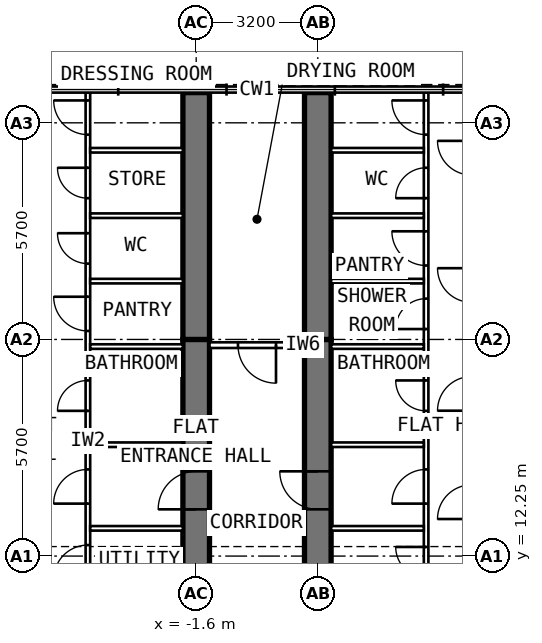
"""IFC4 building model, lengths in metres.
Left out: names, types, materials, properties, quantities, classifications, styles, units other than length and angle.
Written with IfcOpenShell. Run it as: python <this file> out.ifc"""

import sys

from ifc_helpers import new_model, si_unit, direction, frame, frame_2d, origin, place, context, subcontext, project, spatial, rectangle, extrude, element, fill, save


model = new_model("IFC4")
c1 = context("Model", 3, precision=1e-05, world=origin(), true_north=direction((0.0, 1.0)))
c2 = subcontext(c1, "Body", "Model", "MODEL_VIEW")
j1 = project(units=[si_unit("LENGTHUNIT", "METRE"), si_unit("PLANEANGLEUNIT", "RADIAN")], contexts=[c1])
p1 = place(None, origin())
s1 = spatial("IfcSite", under=j1, at=p1, CompositionType="ELEMENT")
p2 = place(p1, origin())
s2 = spatial("IfcBuilding", under=s1, at=p2, CompositionType="ELEMENT")
p3 = place(p2, frame((0.0, 0.0, 281.8)))
s3 = spatial("IfcBuildingStorey", under=s2, at=p3, CompositionType="ELEMENT", Elevation=281.8)
p4 = place(p3, frame((-1.6, 9.6, 0.0), z_axis=(0.0, 0.0, 1.0), x_axis=(0.0, 1.0, 0.0)))
e1 = element("IfcWall", 1, at=p4, inside=s3, PredefinedType="SHEAR", context=c2, shape_type="SweptSolid", body=[
    extrude(rectangle(XDim=8.35, YDim=0.7, at=frame_2d((4.175, 0.0))), origin(), (0.0, 0.0, 1.0), 3.6),
])
p5 = place(p4, frame((3.88, 0.0, 0.0)))
e2 = element("IfcOpeningElement", 2, at=p5, cuts=e1, PredefinedType="OPENING", context=c2, shape_type="SweptSolid", body=[
    extrude(rectangle(XDim=1.0, YDim=2.1, at=frame_2d((0.5, 1.05))), frame((0.0, 0.362, 0.0), z_axis=(0.0, -1.0, 0.0), x_axis=(1.0, 0.0, 0.0)), (0.0, 0.0, 1.0), 0.724),
])
p6 = place(p3, frame((-1.6, 17.95, 0.0), z_axis=(0.0, 0.0, 1.0), x_axis=(0.0, 1.0, 0.0)))
e3 = element("IfcWall", 3, at=p6, inside=s3, PredefinedType="SHEAR", context=c2, shape_type="SweptSolid", body=[
    extrude(rectangle(XDim=6.495, YDim=0.7, at=frame_2d((3.248, 0.0))), origin(), (0.0, 0.0, 1.0), 3.6),
])
p7 = place(p3, frame((1.6, 9.6, 0.0), z_axis=(0.0, 0.0, 1.0), x_axis=(0.0, 1.0, 0.0)))
e4 = element("IfcWall", 4, at=p7, inside=s3, PredefinedType="SHEAR", context=c2, shape_type="SweptSolid", body=[
    extrude(rectangle(XDim=8.35, YDim=0.7, at=frame_2d((4.175, 0.0))), origin(), (0.0, 0.0, 1.0), 3.6),
])
p8 = place(p7, frame((3.88, 0.0, 0.0)))
e5 = element("IfcOpeningElement", 5, at=p8, cuts=e4, PredefinedType="OPENING", context=c2, shape_type="SweptSolid", body=[
    extrude(rectangle(XDim=1.0, YDim=2.1, at=frame_2d((0.5, 1.05))), frame((0.0, 0.362, 0.0), z_axis=(0.0, -1.0, 0.0), x_axis=(1.0, 0.0, 0.0)), (0.0, 0.0, 1.0), 0.724),
])
p9 = place(p3, frame((1.6, 17.95, 0.0), z_axis=(0.0, 0.0, 1.0), x_axis=(0.0, 1.0, 0.0)))
e6 = element("IfcWall", 6, at=p9, inside=s3, PredefinedType="SHEAR", context=c2, shape_type="SweptSolid", body=[
    extrude(rectangle(XDim=6.495, YDim=0.7, at=frame_2d((3.248, 0.0))), origin(), (0.0, 0.0, 1.0), 3.6),
])
p10 = place(p3, frame((-4.45, 9.875, 0.0), z_axis=(0.0, 0.0, 1.0), x_axis=(0.0, 1.0, 0.0)))
e7 = element("IfcWall", 7, at=p10, inside=s3, PredefinedType="PARTITIONING", context=c2, shape_type="SweptSolid", body=[
    extrude(rectangle(XDim=14.57, YDim=0.12, at=frame_2d((7.285, 0.0))), origin(), (0.0, 0.0, 1.0), 3.35),
])
p11 = place(p10, frame((1.765, 0.0, 0.0)))
e8 = element("IfcOpeningElement", 8, at=p11, cuts=e7, PredefinedType="OPENING", context=c2, shape_type="SweptSolid", body=[
    extrude(rectangle(XDim=0.9, YDim=2.1, at=frame_2d((0.45, 1.05))), frame((0.0, 0.072, 0.0), z_axis=(0.0, -1.0, 0.0), x_axis=(1.0, 0.0, 0.0)), (0.0, 0.0, 1.0), 0.144),
])
p12 = place(p10, frame((3.755, 0.0, 0.0)))
e9 = element("IfcOpeningElement", 9, at=p12, cuts=e7, PredefinedType="OPENING", context=c2, shape_type="SweptSolid", body=[
    extrude(rectangle(XDim=0.9, YDim=2.1, at=frame_2d((0.45, 1.05))), frame((0.0, 0.072, 0.0), z_axis=(0.0, -1.0, 0.0), x_axis=(1.0, 0.0, 0.0)), (0.0, 0.0, 1.0), 0.144),
])
p13 = place(p10, frame((6.196, 0.0, 0.0)))
e10 = element("IfcOpeningElement", 10, at=p13, cuts=e7, PredefinedType="OPENING", context=c2, shape_type="SweptSolid", body=[
    extrude(rectangle(XDim=0.8, YDim=2.1, at=frame_2d((0.4, 1.05))), frame((0.0, 0.072, 0.0), z_axis=(0.0, -1.0, 0.0), x_axis=(1.0, 0.0, 0.0)), (0.0, 0.0, 1.0), 0.144),
])
p14 = place(p10, frame((8.299, 0.0, 0.0)))
e11 = element("IfcOpeningElement", 11, at=p14, cuts=e7, PredefinedType="OPENING", context=c2, shape_type="SweptSolid", body=[
    extrude(rectangle(XDim=0.9, YDim=2.1, at=frame_2d((0.45, 1.05))), frame((0.0, 0.072, 0.0), z_axis=(0.0, -1.0, 0.0), x_axis=(1.0, 0.0, 0.0)), (0.0, 0.0, 1.0), 0.144),
])
p15 = place(p10, frame((10.071, 0.0, 0.0)))
e12 = element("IfcOpeningElement", 12, at=p15, cuts=e7, PredefinedType="OPENING", context=c2, shape_type="SweptSolid", body=[
    extrude(rectangle(XDim=0.8, YDim=2.1, at=frame_2d((0.4, 1.05))), frame((0.0, 0.072, 0.0), z_axis=(0.0, -1.0, 0.0), x_axis=(1.0, 0.0, 0.0)), (0.0, 0.0, 1.0), 0.144),
])
p16 = place(p10, frame((11.792, 0.0, 0.0)))
e13 = element("IfcOpeningElement", 13, at=p16, cuts=e7, PredefinedType="OPENING", context=c2, shape_type="SweptSolid", body=[
    extrude(rectangle(XDim=0.8, YDim=2.1, at=frame_2d((0.4, 1.05))), frame((0.0, 0.072, 0.0), z_axis=(0.0, -1.0, 0.0), x_axis=(1.0, 0.0, 0.0)), (0.0, 0.0, 1.0), 0.144),
])
p17 = place(p10, frame((13.464, 0.0, 0.0)))
e14 = element("IfcOpeningElement", 14, at=p17, cuts=e7, PredefinedType="OPENING", context=c2, shape_type="SweptSolid", body=[
    extrude(rectangle(XDim=0.9, YDim=2.1, at=frame_2d((0.45, 1.05))), frame((0.0, 0.072, 0.0), z_axis=(0.0, -1.0, 0.0), x_axis=(1.0, 0.0, 0.0)), (0.0, 0.0, 1.0), 0.144),
])
for number, where, z_axis, x_axis in (
    (15, (-1.95, 12.98, 0.0), (0.0, 0.0, 1.0), (-1.0, 0.0, 0.0)),
    (16, (-1.95, 15.18, 0.0), (0.0, 0.0, 1.0), (-1.0, 0.0, 0.0)),
):
    element("IfcWall", number, at=place(p3, frame(where, z_axis=z_axis, x_axis=x_axis)), inside=s3, PredefinedType="PARTITIONING", context=c2, shape_type="SweptSolid", body=[
        extrude(rectangle(XDim=2.44, YDim=0.12, at=frame_2d((1.22, 0.0))), origin(), (0.0, 0.0, 1.0), 3.35),
    ])
p18 = place(p3, frame((-1.95, 17.763, 0.0), z_axis=(0.0, 0.0, 1.0), x_axis=(-1.0, 0.0, 0.0)))
e17 = element("IfcWall", 17, at=p18, inside=s3, PredefinedType="PARTITIONING", context=c2, shape_type="SweptSolid", body=[
    extrude(rectangle(XDim=2.44, YDim=0.12, at=frame_2d((1.22, 0.0))), origin(), (0.0, 0.0, 1.0), 2.45),
])
for number, where, z_axis, x_axis in (
    (18, (-1.95, 19.485, 0.0), (0.0, 0.0, 1.0), (-1.0, 0.0, 0.0)),
    (19, (-1.95, 21.206, 0.0), (0.0, 0.0, 1.0), (-1.0, 0.0, 0.0)),
    (20, (-1.95, 22.928, 0.0), (0.0, 0.0, 1.0), (-1.0, 0.0, 0.0)),
):
    element("IfcWall", number, at=place(p3, frame(where, z_axis=z_axis, x_axis=x_axis)), inside=s3, PredefinedType="PARTITIONING", context=c2, shape_type="SweptSolid", body=[
        extrude(rectangle(XDim=2.44, YDim=0.12, at=frame_2d((1.22, 0.0))), origin(), (0.0, 0.0, 1.0), 3.35),
    ])
p19 = place(p3, frame((4.45, 9.875, 0.0), z_axis=(0.0, 0.0, 1.0), x_axis=(0.0, 1.0, 0.0)))
e21 = element("IfcWall", 21, at=p19, inside=s3, PredefinedType="PARTITIONING", context=c2, shape_type="SweptSolid", body=[
    extrude(rectangle(XDim=14.57, YDim=0.12, at=frame_2d((7.285, 0.0))), origin(), (0.0, 0.0, 1.0), 3.35),
])
p20 = place(p19, frame((1.815, 0.0, 0.0)))
e22 = element("IfcOpeningElement", 22, at=p20, cuts=e21, PredefinedType="OPENING", context=c2, shape_type="SweptSolid", body=[
    extrude(rectangle(XDim=0.8, YDim=2.1, at=frame_2d((0.4, 1.05))), frame((0.0, 0.072, 0.0), z_axis=(0.0, -1.0, 0.0), x_axis=(1.0, 0.0, 0.0)), (0.0, 0.0, 1.0), 0.144),
])
p21 = place(p19, frame((3.755, 0.0, 0.0)))
e23 = element("IfcOpeningElement", 23, at=p21, cuts=e21, PredefinedType="OPENING", context=c2, shape_type="SweptSolid", body=[
    extrude(rectangle(XDim=0.9, YDim=2.1, at=frame_2d((0.45, 1.05))), frame((0.0, 0.072, 0.0), z_axis=(0.0, -1.0, 0.0), x_axis=(1.0, 0.0, 0.0)), (0.0, 0.0, 1.0), 0.144),
])
p22 = place(p19, frame((6.196, 0.0, 0.0)))
e24 = element("IfcOpeningElement", 24, at=p22, cuts=e21, PredefinedType="OPENING", context=c2, shape_type="SweptSolid", body=[
    extrude(rectangle(XDim=0.8, YDim=2.1, at=frame_2d((0.4, 1.05))), frame((0.0, 0.072, 0.0), z_axis=(0.0, -1.0, 0.0), x_axis=(1.0, 0.0, 0.0)), (0.0, 0.0, 1.0), 0.144),
])
p23 = place(p19, frame((8.349, 0.0, 0.0)))
e25 = element("IfcOpeningElement", 25, at=p23, cuts=e21, PredefinedType="OPENING", context=c2, shape_type="SweptSolid", body=[
    extrude(rectangle(XDim=0.8, YDim=2.1, at=frame_2d((0.4, 1.05))), frame((0.0, 0.072, 0.0), z_axis=(0.0, -1.0, 0.0), x_axis=(1.0, 0.0, 0.0)), (0.0, 0.0, 1.0), 0.144),
])
p24 = place(p19, frame((10.021, 0.0, 0.0)))
e26 = element("IfcOpeningElement", 26, at=p24, cuts=e21, PredefinedType="OPENING", context=c2, shape_type="SweptSolid", body=[
    extrude(rectangle(XDim=0.9, YDim=2.1, at=frame_2d((0.45, 1.05))), frame((0.0, 0.072, 0.0), z_axis=(0.0, -1.0, 0.0), x_axis=(1.0, 0.0, 0.0)), (0.0, 0.0, 1.0), 0.144),
])
p25 = place(p19, frame((11.792, 0.0, 0.0)))
e27 = element("IfcOpeningElement", 27, at=p25, cuts=e21, PredefinedType="OPENING", context=c2, shape_type="SweptSolid", body=[
    extrude(rectangle(XDim=0.8, YDim=2.1, at=frame_2d((0.4, 1.05))), frame((0.0, 0.072, 0.0), z_axis=(0.0, -1.0, 0.0), x_axis=(1.0, 0.0, 0.0)), (0.0, 0.0, 1.0), 0.144),
])
p26 = place(p19, frame((13.464, 0.0, 0.0)))
e28 = element("IfcOpeningElement", 28, at=p26, cuts=e21, PredefinedType="OPENING", context=c2, shape_type="SweptSolid", body=[
    extrude(rectangle(XDim=0.9, YDim=2.1, at=frame_2d((0.45, 1.05))), frame((0.0, 0.072, 0.0), z_axis=(0.0, -1.0, 0.0), x_axis=(1.0, 0.0, 0.0)), (0.0, 0.0, 1.0), 0.144),
])
for number, where, z_axis, x_axis in (
    (29, (1.95, 12.98, 0.0), (0.0, 0.0, 1.0), (1.0, 0.0, 0.0)),
    (30, (1.95, 15.18, 0.0), (0.0, 0.0, 1.0), (1.0, 0.0, 0.0)),
):
    element("IfcWall", number, at=place(p3, frame(where, z_axis=z_axis, x_axis=x_axis)), inside=s3, PredefinedType="PARTITIONING", context=c2, shape_type="SweptSolid", body=[
        extrude(rectangle(XDim=2.44, YDim=0.12, at=frame_2d((1.22, 0.0))), origin(), (0.0, 0.0, 1.0), 3.35),
    ])
p27 = place(p3, frame((1.95, 17.763, 0.0), z_axis=(0.0, 0.0, 1.0), x_axis=(1.0, 0.0, 0.0)))
e31 = element("IfcWall", 31, at=p27, inside=s3, PredefinedType="PARTITIONING", context=c2, shape_type="SweptSolid", body=[
    extrude(rectangle(XDim=2.44, YDim=0.12, at=frame_2d((1.22, 0.0))), origin(), (0.0, 0.0, 1.0), 2.45),
])
for number, where, z_axis, x_axis in (
    (32, (1.95, 19.485, 0.0), (0.0, 0.0, 1.0), (1.0, 0.0, 0.0)),
    (33, (1.95, 21.206, 0.0), (0.0, 0.0, 1.0), (1.0, 0.0, 0.0)),
    (34, (1.95, 22.928, 0.0), (0.0, 0.0, 1.0), (1.0, 0.0, 0.0)),
):
    element("IfcWall", number, at=place(p3, frame(where, z_axis=z_axis, x_axis=x_axis)), inside=s3, PredefinedType="PARTITIONING", context=c2, shape_type="SweptSolid", body=[
        extrude(rectangle(XDim=2.44, YDim=0.12, at=frame_2d((1.22, 0.0))), origin(), (0.0, 0.0, 1.0), 3.35),
    ])
p28 = place(p3, frame((1.25, 17.8, 0.0), z_axis=(0.0, 0.0, 1.0), x_axis=(-1.0, 0.0, 0.0)))
e35 = element("IfcWall", 35, at=p28, inside=s3, PredefinedType="PARTITIONING", context=c2, shape_type="SweptSolid", body=[
    extrude(rectangle(XDim=2.5, YDim=0.15, at=frame_2d((1.25, 0.0))), origin(), (0.0, 0.0, 1.0), 3.35),
])
p29 = place(p28, frame((0.75, 0.0, 0.0)))
e36 = element("IfcOpeningElement", 36, at=p29, cuts=e35, PredefinedType="OPENING", context=c2, shape_type="SweptSolid", body=[
    extrude(rectangle(XDim=1.0, YDim=2.1, at=frame_2d((0.5, 1.05))), frame((0.0, 0.087, 0.0), z_axis=(0.0, -1.0, 0.0), x_axis=(1.0, 0.0, 0.0)), (0.0, 0.0, 1.0), 0.174),
])
p30 = place(p5, origin())
e37 = element("IfcDoor", 37, at=p30, inside=s3, OperationType="SINGLE_SWING_LEFT", PredefinedType="DOOR", context=c2, shape_type="SweptSolid", body=[
    extrude(rectangle(XDim=1.0, YDim=2.1, at=frame_2d((0.5, 1.05))), frame((0.0, 0.1, 0.0), z_axis=(0.0, -1.0, 0.0), x_axis=(1.0, 0.0, 0.0)), (0.0, 0.0, 1.0), 0.2),
])
fill(e2, e37)
p31 = place(p11, origin())
e38 = element("IfcDoor", 38, at=p31, inside=s3, OperationType="SINGLE_SWING_LEFT", PredefinedType="DOOR", context=c2, shape_type="SweptSolid", body=[
    extrude(rectangle(XDim=0.9, YDim=2.1, at=frame_2d((0.45, 1.05))), frame((0.0, 0.025, 0.0), z_axis=(0.0, -1.0, 0.0), x_axis=(1.0, 0.0, 0.0)), (0.0, 0.0, 1.0), 0.05),
])
fill(e8, e38)
p32 = place(p12, origin())
e39 = element("IfcDoor", 39, at=p32, inside=s3, OperationType="SINGLE_SWING_LEFT", PredefinedType="DOOR", context=c2, shape_type="SweptSolid", body=[
    extrude(rectangle(XDim=0.9, YDim=2.1, at=frame_2d((0.45, 1.05))), frame((0.0, 0.025, 0.0), z_axis=(0.0, -1.0, 0.0), x_axis=(1.0, 0.0, 0.0)), (0.0, 0.0, 1.0), 0.05),
])
fill(e9, e39)
p33 = place(p13, origin())
e40 = element("IfcDoor", 40, at=p33, inside=s3, OperationType="SINGLE_SWING_LEFT", PredefinedType="DOOR", context=c2, shape_type="SweptSolid", body=[
    extrude(rectangle(XDim=0.8, YDim=2.1, at=frame_2d((0.4, 1.05))), frame((0.0, 0.025, 0.0), z_axis=(0.0, -1.0, 0.0), x_axis=(1.0, 0.0, 0.0)), (0.0, 0.0, 1.0), 0.05),
])
fill(e10, e40)
p34 = place(p14, origin())
e41 = element("IfcDoor", 41, at=p34, inside=s3, OperationType="SINGLE_SWING_RIGHT", PredefinedType="DOOR", context=c2, shape_type="SweptSolid", body=[
    extrude(rectangle(XDim=0.9, YDim=2.1, at=frame_2d((0.45, 1.05))), frame((0.0, 0.025, 0.0), z_axis=(0.0, -1.0, 0.0), x_axis=(1.0, 0.0, 0.0)), (0.0, 0.0, 1.0), 0.05),
])
fill(e11, e41)
p35 = place(p15, origin())
e42 = element("IfcDoor", 42, at=p35, inside=s3, OperationType="SINGLE_SWING_RIGHT", PredefinedType="DOOR", context=c2, shape_type="SweptSolid", body=[
    extrude(rectangle(XDim=0.8, YDim=2.1, at=frame_2d((0.4, 1.05))), frame((0.0, 0.025, 0.0), z_axis=(0.0, -1.0, 0.0), x_axis=(1.0, 0.0, 0.0)), (0.0, 0.0, 1.0), 0.05),
])
fill(e12, e42)
p36 = place(p16, origin())
e43 = element("IfcDoor", 43, at=p36, inside=s3, OperationType="SINGLE_SWING_RIGHT", PredefinedType="DOOR", context=c2, shape_type="SweptSolid", body=[
    extrude(rectangle(XDim=0.8, YDim=2.1, at=frame_2d((0.4, 1.05))), frame((0.0, 0.025, 0.0), z_axis=(0.0, -1.0, 0.0), x_axis=(1.0, 0.0, 0.0)), (0.0, 0.0, 1.0), 0.05),
])
fill(e13, e43)
p37 = place(p17, origin())
e44 = element("IfcDoor", 44, at=p37, inside=s3, OperationType="SINGLE_SWING_RIGHT", PredefinedType="DOOR", context=c2, shape_type="SweptSolid", body=[
    extrude(rectangle(XDim=0.9, YDim=2.1, at=frame_2d((0.45, 1.05))), frame((0.0, 0.025, 0.0), z_axis=(0.0, -1.0, 0.0), x_axis=(1.0, 0.0, 0.0)), (0.0, 0.0, 1.0), 0.05),
])
fill(e14, e44)
p38 = place(p8, origin())
e45 = element("IfcDoor", 45, at=p38, inside=s3, OperationType="SINGLE_SWING_RIGHT", PredefinedType="DOOR", context=c2, shape_type="SweptSolid", body=[
    extrude(rectangle(XDim=1.0, YDim=2.1, at=frame_2d((0.5, 1.05))), frame((0.0, 0.1, 0.0), z_axis=(0.0, -1.0, 0.0), x_axis=(1.0, 0.0, 0.0)), (0.0, 0.0, 1.0), 0.2),
])
fill(e5, e45)
p39 = place(p20, origin())
e46 = element("IfcDoor", 46, at=p39, inside=s3, OperationType="SINGLE_SWING_RIGHT", PredefinedType="DOOR", context=c2, shape_type="SweptSolid", body=[
    extrude(rectangle(XDim=0.8, YDim=2.1, at=frame_2d((0.4, 1.05))), frame((0.0, 0.025, 0.0), z_axis=(0.0, -1.0, 0.0), x_axis=(1.0, 0.0, 0.0)), (0.0, 0.0, 1.0), 0.05),
])
fill(e22, e46)
p40 = place(p21, origin())
e47 = element("IfcDoor", 47, at=p40, inside=s3, OperationType="SINGLE_SWING_LEFT", PredefinedType="DOOR", context=c2, shape_type="SweptSolid", body=[
    extrude(rectangle(XDim=0.9, YDim=2.1, at=frame_2d((0.45, 1.05))), frame((0.0, 0.025, 0.0), z_axis=(0.0, -1.0, 0.0), x_axis=(1.0, 0.0, 0.0)), (0.0, 0.0, 1.0), 0.05),
])
fill(e23, e47)
p41 = place(p22, origin())
e48 = element("IfcDoor", 48, at=p41, inside=s3, OperationType="SINGLE_SWING_RIGHT", PredefinedType="DOOR", context=c2, shape_type="SweptSolid", body=[
    extrude(rectangle(XDim=0.8, YDim=2.1, at=frame_2d((0.4, 1.05))), frame((0.0, 0.025, 0.0), z_axis=(0.0, -1.0, 0.0), x_axis=(1.0, 0.0, 0.0)), (0.0, 0.0, 1.0), 0.05),
])
fill(e24, e48)
p42 = place(p23, origin())
e49 = element("IfcDoor", 49, at=p42, inside=s3, OperationType="SINGLE_SWING_LEFT", PredefinedType="DOOR", context=c2, shape_type="SweptSolid", body=[
    extrude(rectangle(XDim=0.8, YDim=2.1, at=frame_2d((0.4, 1.05))), frame((0.0, 0.025, 0.0), z_axis=(0.0, -1.0, 0.0), x_axis=(1.0, 0.0, 0.0)), (0.0, 0.0, 1.0), 0.05),
])
fill(e25, e49)
p43 = place(p24, origin())
e50 = element("IfcDoor", 50, at=p43, inside=s3, OperationType="SINGLE_SWING_RIGHT", PredefinedType="DOOR", context=c2, shape_type="SweptSolid", body=[
    extrude(rectangle(XDim=0.9, YDim=2.1, at=frame_2d((0.45, 1.05))), frame((0.0, 0.025, 0.0), z_axis=(0.0, -1.0, 0.0), x_axis=(1.0, 0.0, 0.0)), (0.0, 0.0, 1.0), 0.05),
])
fill(e26, e50)
p44 = place(p25, origin())
e51 = element("IfcDoor", 51, at=p44, inside=s3, OperationType="SINGLE_SWING_LEFT", PredefinedType="DOOR", context=c2, shape_type="SweptSolid", body=[
    extrude(rectangle(XDim=0.8, YDim=2.1, at=frame_2d((0.4, 1.05))), frame((0.0, 0.025, 0.0), z_axis=(0.0, -1.0, 0.0), x_axis=(1.0, 0.0, 0.0)), (0.0, 0.0, 1.0), 0.05),
])
fill(e27, e51)
p45 = place(p26, origin())
e52 = element("IfcDoor", 52, at=p45, inside=s3, OperationType="SINGLE_SWING_RIGHT", PredefinedType="DOOR", context=c2, shape_type="SweptSolid", body=[
    extrude(rectangle(XDim=0.9, YDim=2.1, at=frame_2d((0.45, 1.05))), frame((0.0, 0.025, 0.0), z_axis=(0.0, -1.0, 0.0), x_axis=(1.0, 0.0, 0.0)), (0.0, 0.0, 1.0), 0.05),
])
fill(e28, e52)
p46 = place(p29, origin())
e53 = element("IfcDoor", 53, at=p46, inside=s3, OperationType="SINGLE_SWING_LEFT", PredefinedType="DOOR", context=c2, shape_type="SweptSolid", body=[
    extrude(rectangle(XDim=1.0, YDim=2.1, at=frame_2d((0.5, 1.05))), frame((0.0, 0.025, 0.0), z_axis=(0.0, -1.0, 0.0), x_axis=(1.0, 0.0, 0.0)), (0.0, 0.0, 1.0), 0.05),
])
fill(e36, e53)
save(model, sys.argv[1])
